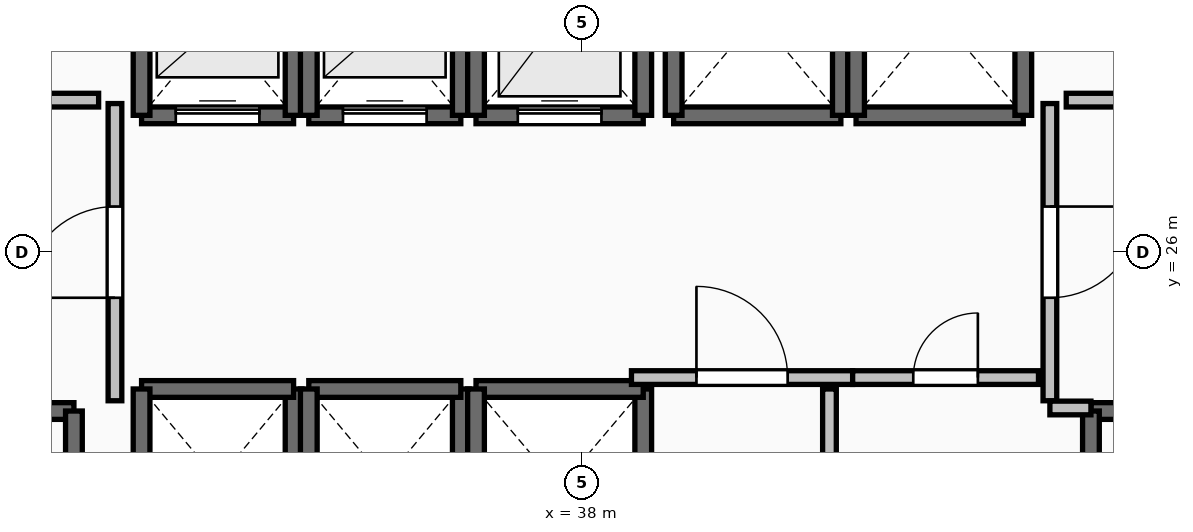
"""IFC4 building model, lengths in metres.
Left out: names, types, materials, properties, quantities, classifications, styles, units other than length and angle.
Written with IfcOpenShell. Run it as: python <this file> out.ifc"""

import sys

from ifc_helpers import new_model, si_unit, direction, frame, frame_2d, origin, place, context, subcontext, project, spatial, rectangle, extrude, element, fill, save


model = new_model("IFC4")
c1 = context("Model", 3, precision=1e-05, world=origin(), true_north=direction((0.0, 1.0)))
c2 = subcontext(c1, "Body", "Model", "MODEL_VIEW")
j1 = project(units=[si_unit("LENGTHUNIT", "METRE"), si_unit("PLANEANGLEUNIT", "RADIAN")], contexts=[c1])
p1 = place(None, origin())
s1 = spatial("IfcSite", under=j1, at=p1, CompositionType="ELEMENT")
p2 = place(p1, origin())
s2 = spatial("IfcBuilding", under=s1, at=p2, CompositionType="ELEMENT")
p3 = place(p2, frame((0.0, 0.0, 78.8)))
s3 = spatial("IfcBuildingStorey", under=s2, at=p3, CompositionType="ELEMENT", Elevation=78.8)
p4 = place(p3, frame((27.94, 23.91, 0.0), z_axis=(0.0, 0.0, 1.0), x_axis=(1.0, 0.0, 0.0)))
e1 = element("IfcWall", 1, at=p4, inside=s3, PredefinedType="SOLIDWALL", context=c2, shape_type="SweptSolid", body=[
    extrude(rectangle(XDim=3.37, YDim=0.22, at=frame_2d((1.685, 0.0))), origin(), (0.0, 0.0, 1.0), 3.24),
])
p5 = place(p4, frame((1.135, 0.0, 0.0)))
e2 = element("IfcOpeningElement", 2, at=p5, cuts=e1, PredefinedType="OPENING", context=c2, shape_type="SweptSolid", body=[
    extrude(rectangle(XDim=1.1, YDim=2.15, at=frame_2d((0.55, 1.075))), frame((0.0, 0.125, 0.0), z_axis=(0.0, -1.0, 0.0), x_axis=(1.0, 0.0, 0.0)), (0.0, 0.0, 1.0), 0.25),
])
p6 = place(p3, frame((31.31, 23.91, 0.0), z_axis=(0.0, 0.0, 1.0), x_axis=(0.0, -1.0, 0.0)))
e3 = element("IfcWall", 3, at=p6, inside=s3, PredefinedType="SOLIDWALL", context=c2, shape_type="SweptSolid", body=[
    extrude(rectangle(XDim=7.42, YDim=0.22, at=frame_2d((3.71, 0.0))), origin(), (0.0, 0.0, 1.0), 3.24),
])
p7 = place(p3, frame((44.69, 23.91, 0.0), z_axis=(0.0, 0.0, 1.0), x_axis=(1.0, 0.0, 0.0)))
e4 = element("IfcWall", 4, at=p7, inside=s3, PredefinedType="SOLIDWALL", context=c2, shape_type="SweptSolid", body=[
    extrude(rectangle(XDim=3.37, YDim=0.22, at=frame_2d((1.685, 0.0))), origin(), (0.0, 0.0, 1.0), 3.24),
])
p8 = place(p7, frame((1.135, 0.0, 0.0)))
e5 = element("IfcOpeningElement", 5, at=p8, cuts=e4, PredefinedType="OPENING", context=c2, shape_type="SweptSolid", body=[
    extrude(rectangle(XDim=1.1, YDim=2.15, at=frame_2d((0.55, 1.075))), frame((0.0, 0.125, 0.0), z_axis=(0.0, -1.0, 0.0), x_axis=(1.0, 0.0, 0.0)), (0.0, 0.0, 1.0), 0.25),
])
p9 = place(p3, frame((44.69, 16.49, 0.0), z_axis=(0.0, 0.0, 1.0), x_axis=(0.0, 1.0, 0.0)))
e6 = element("IfcWall", 6, at=p9, inside=s3, PredefinedType="SOLIDWALL", context=c2, shape_type="SweptSolid", body=[
    extrude(rectangle(XDim=7.42, YDim=0.22, at=frame_2d((3.71, 0.0))), origin(), (0.0, 0.0, 1.0), 3.24),
])
p10 = place(p3, frame((32.2, 27.8, 0.0), z_axis=(0.0, 0.0, 1.0), x_axis=(1.0, 0.0, 0.0)))
e7 = element("IfcWall", 7, at=p10, inside=s3, PredefinedType="SOLIDWALL", context=c2, shape_type="SweptSolid", body=[
    extrude(rectangle(XDim=2.0, YDim=0.22, at=frame_2d((1.0, 0.0))), origin(), (0.0, 0.0, 1.0), 3.24),
])
p11 = place(p10, frame((0.45, 0.0, 0.0)))
e8 = element("IfcOpeningElement", 8, at=p11, cuts=e7, PredefinedType="OPENING", context=c2, shape_type="SweptSolid", body=[
    extrude(rectangle(XDim=1.1, YDim=2.2, at=frame_2d((0.55, 1.1))), frame((0.0, 0.125, 0.0), z_axis=(0.0, -1.0, 0.0), x_axis=(1.0, 0.0, 0.0)), (0.0, 0.0, 1.0), 0.25),
])
for number, where, z_axis, x_axis in (
    (9, (34.2, 27.8, 0.0), (0.0, 0.0, 1.0), (0.0, 1.0, 0.0)),
    (10, (32.2, 30.2, 0.0), (0.0, 0.0, 1.0), (0.0, -1.0, 0.0)),
):
    element("IfcWall", number, at=place(p3, frame(where, z_axis=z_axis, x_axis=x_axis)), inside=s3, PredefinedType="SOLIDWALL", context=c2, shape_type="SweptSolid", body=[
        extrude(rectangle(XDim=2.4, YDim=0.22, at=frame_2d((1.2, 0.0))), origin(), (0.0, 0.0, 1.0), 3.24),
    ])
p12 = place(p3, frame((34.4, 27.8, 0.0), z_axis=(0.0, 0.0, 1.0), x_axis=(1.0, 0.0, 0.0)))
e11 = element("IfcWall", 11, at=p12, inside=s3, PredefinedType="SOLIDWALL", context=c2, shape_type="SweptSolid", body=[
    extrude(rectangle(XDim=2.0, YDim=0.22, at=frame_2d((1.0, 0.0))), origin(), (0.0, 0.0, 1.0), 3.24),
])
p13 = place(p12, frame((0.45, 0.0, 0.0)))
e12 = element("IfcOpeningElement", 12, at=p13, cuts=e11, PredefinedType="OPENING", context=c2, shape_type="SweptSolid", body=[
    extrude(rectangle(XDim=1.1, YDim=2.2, at=frame_2d((0.55, 1.1))), frame((0.0, 0.125, 0.0), z_axis=(0.0, -1.0, 0.0), x_axis=(1.0, 0.0, 0.0)), (0.0, 0.0, 1.0), 0.25),
])
for number, where, z_axis, x_axis in (
    (13, (36.4, 27.8, 0.0), (0.0, 0.0, 1.0), (0.0, 1.0, 0.0)),
    (14, (34.4, 30.2, 0.0), (0.0, 0.0, 1.0), (0.0, -1.0, 0.0)),
):
    element("IfcWall", number, at=place(p3, frame(where, z_axis=z_axis, x_axis=x_axis)), inside=s3, PredefinedType="SOLIDWALL", context=c2, shape_type="SweptSolid", body=[
        extrude(rectangle(XDim=2.4, YDim=0.22, at=frame_2d((1.2, 0.0))), origin(), (0.0, 0.0, 1.0), 3.24),
    ])
p14 = place(p3, frame((36.6, 27.8, 0.0), z_axis=(0.0, 0.0, 1.0), x_axis=(1.0, 0.0, 0.0)))
e15 = element("IfcWall", 15, at=p14, inside=s3, PredefinedType="SOLIDWALL", context=c2, shape_type="SweptSolid", body=[
    extrude(rectangle(XDim=2.2, YDim=0.22, at=frame_2d((1.1, 0.0))), origin(), (0.0, 0.0, 1.0), 3.24),
])
p15 = place(p14, frame((0.55, 0.0, 0.0)))
e16 = element("IfcOpeningElement", 16, at=p15, cuts=e15, PredefinedType="OPENING", context=c2, shape_type="SweptSolid", body=[
    extrude(rectangle(XDim=1.1, YDim=2.2, at=frame_2d((0.55, 1.1))), frame((0.0, 0.125, 0.0), z_axis=(0.0, -1.0, 0.0), x_axis=(1.0, 0.0, 0.0)), (0.0, 0.0, 1.0), 0.25),
])
for number, where, z_axis, x_axis in (
    (17, (38.8, 27.8, 0.0), (0.0, 0.0, 1.0), (0.0, 1.0, 0.0)),
    (18, (36.6, 30.4, 0.0), (0.0, 0.0, 1.0), (0.0, -1.0, 0.0)),
):
    element("IfcWall", number, at=place(p3, frame(where, z_axis=z_axis, x_axis=x_axis)), inside=s3, PredefinedType="SOLIDWALL", context=c2, shape_type="SweptSolid", body=[
        extrude(rectangle(XDim=2.6, YDim=0.22, at=frame_2d((1.3, 0.0))), origin(), (0.0, 0.0, 1.0), 3.24),
    ])
p16 = place(p3, frame((34.2, 21.8, 0.0), z_axis=(0.0, 0.0, 1.0), x_axis=(0.0, 1.0, 0.0)))
e19 = element("IfcWall", 19, at=p16, inside=s3, PredefinedType="SOLIDWALL", context=c2, shape_type="SweptSolid", body=[
    extrude(rectangle(XDim=2.4, YDim=0.22, at=frame_2d((1.2, 0.0))), origin(), (0.0, 0.0, 1.0), 3.24),
])
p17 = place(p3, frame((34.2, 24.2, 0.0), z_axis=(0.0, 0.0, 1.0), x_axis=(-1.0, 0.0, 0.0)))
e20 = element("IfcWall", 20, at=p17, inside=s3, PredefinedType="SOLIDWALL", context=c2, shape_type="SweptSolid", body=[
    extrude(rectangle(XDim=2.0, YDim=0.22, at=frame_2d((1.0, 0.0))), origin(), (0.0, 0.0, 1.0), 3.24),
])
for number, where, z_axis, x_axis in (
    (21, (32.2, 24.2, 0.0), (0.0, 0.0, 1.0), (0.0, -1.0, 0.0)),
    (22, (36.4, 21.8, 0.0), (0.0, 0.0, 1.0), (0.0, 1.0, 0.0)),
):
    element("IfcWall", number, at=place(p3, frame(where, z_axis=z_axis, x_axis=x_axis)), inside=s3, PredefinedType="SOLIDWALL", context=c2, shape_type="SweptSolid", body=[
        extrude(rectangle(XDim=2.4, YDim=0.22, at=frame_2d((1.2, 0.0))), origin(), (0.0, 0.0, 1.0), 3.24),
    ])
p18 = place(p3, frame((36.4, 24.2, 0.0), z_axis=(0.0, 0.0, 1.0), x_axis=(-1.0, 0.0, 0.0)))
e23 = element("IfcWall", 23, at=p18, inside=s3, PredefinedType="SOLIDWALL", context=c2, shape_type="SweptSolid", body=[
    extrude(rectangle(XDim=2.0, YDim=0.22, at=frame_2d((1.0, 0.0))), origin(), (0.0, 0.0, 1.0), 3.24),
])
p19 = place(p3, frame((34.4, 24.2, 0.0), z_axis=(0.0, 0.0, 1.0), x_axis=(0.0, -1.0, 0.0)))
e24 = element("IfcWall", 24, at=p19, inside=s3, PredefinedType="SOLIDWALL", context=c2, shape_type="SweptSolid", body=[
    extrude(rectangle(XDim=2.4, YDim=0.22, at=frame_2d((1.2, 0.0))), origin(), (0.0, 0.0, 1.0), 3.24),
])
p20 = place(p3, frame((38.8, 21.6, 0.0), z_axis=(0.0, 0.0, 1.0), x_axis=(0.0, 1.0, 0.0)))
e25 = element("IfcWall", 25, at=p20, inside=s3, PredefinedType="SOLIDWALL", context=c2, shape_type="SweptSolid", body=[
    extrude(rectangle(XDim=2.6, YDim=0.22, at=frame_2d((1.3, 0.0))), origin(), (0.0, 0.0, 1.0), 3.24),
])
p21 = place(p3, frame((38.8, 24.2, 0.0), z_axis=(0.0, 0.0, 1.0), x_axis=(-1.0, 0.0, 0.0)))
e26 = element("IfcWall", 26, at=p21, inside=s3, PredefinedType="SOLIDWALL", context=c2, shape_type="SweptSolid", body=[
    extrude(rectangle(XDim=2.2, YDim=0.22, at=frame_2d((1.1, 0.0))), origin(), (0.0, 0.0, 1.0), 3.24),
])
p22 = place(p3, frame((36.6, 24.2, 0.0), z_axis=(0.0, 0.0, 1.0), x_axis=(0.0, -1.0, 0.0)))
e27 = element("IfcWall", 27, at=p22, inside=s3, PredefinedType="SOLIDWALL", context=c2, shape_type="SweptSolid", body=[
    extrude(rectangle(XDim=2.6, YDim=0.22, at=frame_2d((1.3, 0.0))), origin(), (0.0, 0.0, 1.0), 3.24),
])
p23 = place(p3, frame((39.2, 27.8, 0.0), z_axis=(0.0, 0.0, 1.0), x_axis=(1.0, 0.0, 0.0)))
e28 = element("IfcWall", 28, at=p23, inside=s3, PredefinedType="SOLIDWALL", context=c2, shape_type="SweptSolid", body=[
    extrude(rectangle(XDim=2.2, YDim=0.22, at=frame_2d((1.1, 0.0))), origin(), (0.0, 0.0, 1.0), 3.24),
])
for number, where, z_axis, x_axis in (
    (29, (41.4, 27.8, 0.0), (0.0, 0.0, 1.0), (0.0, 1.0, 0.0)),
    (30, (39.2, 30.4, 0.0), (0.0, 0.0, 1.0), (0.0, -1.0, 0.0)),
):
    element("IfcWall", number, at=place(p3, frame(where, z_axis=z_axis, x_axis=x_axis)), inside=s3, PredefinedType="SOLIDWALL", context=c2, shape_type="SweptSolid", body=[
        extrude(rectangle(XDim=2.6, YDim=0.22, at=frame_2d((1.3, 0.0))), origin(), (0.0, 0.0, 1.0), 3.24),
    ])
p24 = place(p3, frame((41.6, 27.8, 0.0), z_axis=(0.0, 0.0, 1.0), x_axis=(1.0, 0.0, 0.0)))
e31 = element("IfcWall", 31, at=p24, inside=s3, PredefinedType="SOLIDWALL", context=c2, shape_type="SweptSolid", body=[
    extrude(rectangle(XDim=2.2, YDim=0.22, at=frame_2d((1.1, 0.0))), origin(), (0.0, 0.0, 1.0), 3.24),
])
for number, where, z_axis, x_axis in (
    (32, (43.8, 27.8, 0.0), (0.0, 0.0, 1.0), (0.0, 1.0, 0.0)),
    (33, (41.6, 30.4, 0.0), (0.0, 0.0, 1.0), (0.0, -1.0, 0.0)),
):
    element("IfcWall", number, at=place(p3, frame(where, z_axis=z_axis, x_axis=x_axis)), inside=s3, PredefinedType="SOLIDWALL", context=c2, shape_type="SweptSolid", body=[
        extrude(rectangle(XDim=2.6, YDim=0.22, at=frame_2d((1.3, 0.0))), origin(), (0.0, 0.0, 1.0), 3.24),
    ])
p25 = place(p3, frame((31.85, 24.045, 0.0), z_axis=(0.0, 0.0, 1.0), x_axis=(0.0, 1.0, 0.0)))
e34 = element("IfcWall", 34, at=p25, inside=s3, PredefinedType="PARTITIONING", context=c2, shape_type="SweptSolid", body=[
    extrude(rectangle(XDim=3.91, YDim=0.18, at=frame_2d((1.955, 0.0))), origin(), (0.0, 0.0, 1.0), 3.24),
])
p26 = place(p25, frame((1.355, 0.0, 0.0)))
e35 = element("IfcOpeningElement", 35, at=p26, cuts=e34, PredefinedType="OPENING", context=c2, shape_type="SweptSolid", body=[
    extrude(rectangle(XDim=1.2, YDim=2.15, at=frame_2d((0.6, 1.075))), frame((0.0, 0.105, 0.0), z_axis=(0.0, -1.0, 0.0), x_axis=(1.0, 0.0, 0.0)), (0.0, 0.0, 1.0), 0.21),
])
p27 = place(p3, frame((44.15, 27.955, 0.0), z_axis=(0.0, 0.0, 1.0), x_axis=(0.0, -1.0, 0.0)))
e36 = element("IfcWall", 36, at=p27, inside=s3, PredefinedType="PARTITIONING", context=c2, shape_type="SweptSolid", body=[
    extrude(rectangle(XDim=3.91, YDim=0.18, at=frame_2d((1.955, 0.0))), origin(), (0.0, 0.0, 1.0), 3.24),
])
p28 = place(p27, frame((1.355, 0.0, 0.0)))
e37 = element("IfcOpeningElement", 37, at=p28, cuts=e36, PredefinedType="OPENING", context=c2, shape_type="SweptSolid", body=[
    extrude(rectangle(XDim=1.2, YDim=2.15, at=frame_2d((0.6, 1.075))), frame((0.0, 0.105, 0.0), z_axis=(0.0, -1.0, 0.0), x_axis=(1.0, 0.0, 0.0)), (0.0, 0.0, 1.0), 0.21),
])
p29 = place(p3, frame((44.15, 23.95, 0.0), z_axis=(0.0, 0.0, 1.0), x_axis=(1.0, 0.0, 0.0)))
e38 = element("IfcWall", 38, at=p29, inside=s3, PredefinedType="PARTITIONING", context=c2, shape_type="SweptSolid", body=[
    extrude(rectangle(XDim=0.54, YDim=0.18, at=frame_2d((0.27, 0.0))), origin(), (0.0, 0.0, 1.0), 3.24),
])
p30 = place(p3, frame((38.645, 24.35, 0.0), z_axis=(0.0, 0.0, 1.0), x_axis=(1.0, 0.0, 0.0)))
e39 = element("IfcWall", 39, at=p30, inside=s3, PredefinedType="PARTITIONING", context=c2, shape_type="SweptSolid", body=[
    extrude(rectangle(XDim=2.91, YDim=0.18, at=frame_2d((1.455, 0.0))), origin(), (0.0, 0.0, 1.0), 3.24),
])
p31 = place(p30, frame((0.855, 0.0, 0.0)))
e40 = element("IfcOpeningElement", 40, at=p31, cuts=e39, PredefinedType="OPENING", context=c2, shape_type="SweptSolid", body=[
    extrude(rectangle(XDim=1.2, YDim=2.15, at=frame_2d((0.6, 1.075))), frame((0.0, 0.105, 0.0), z_axis=(0.0, -1.0, 0.0), x_axis=(1.0, 0.0, 0.0)), (0.0, 0.0, 1.0), 0.21),
])
p32 = place(p3, frame((41.555, 24.35, 0.0), z_axis=(0.0, 0.0, 1.0), x_axis=(1.0, 0.0, 0.0)))
e41 = element("IfcWall", 41, at=p32, inside=s3, PredefinedType="PARTITIONING", context=c2, shape_type="SweptSolid", body=[
    extrude(rectangle(XDim=2.445, YDim=0.18, at=frame_2d((1.223, 0.0))), origin(), (0.0, 0.0, 1.0), 3.24),
])
p33 = place(p32, frame((0.798, 0.0, 0.0)))
e42 = element("IfcOpeningElement", 42, at=p33, cuts=e41, PredefinedType="OPENING", context=c2, shape_type="SweptSolid", body=[
    extrude(rectangle(XDim=0.85, YDim=2.1, at=frame_2d((0.425, 1.05))), frame((0.0, 0.105, 0.0), z_axis=(0.0, -1.0, 0.0), x_axis=(1.0, 0.0, 0.0)), (0.0, 0.0, 1.0), 0.21),
])
p34 = place(p3, frame((41.25, 20.305, 0.0), z_axis=(0.0, 0.0, 1.0), x_axis=(0.0, 1.0, 0.0)))
e43 = element("IfcWall", 43, at=p34, inside=s3, PredefinedType="PARTITIONING", context=c2, shape_type="SweptSolid", body=[
    extrude(rectangle(XDim=3.895, YDim=0.18, at=frame_2d((1.948, 0.0))), origin(), (0.0, 0.0, 1.0), 3.24),
])
p35 = place(p34, frame((1.522, 0.0, 0.0)))
e44 = element("IfcOpeningElement", 44, at=p35, cuts=e43, PredefinedType="OPENING", context=c2, shape_type="SweptSolid", body=[
    extrude(rectangle(XDim=0.85, YDim=2.1, at=frame_2d((0.425, 1.05))), frame((0.0, 0.105, 0.0), z_axis=(0.0, -1.0, 0.0), x_axis=(1.0, 0.0, 0.0)), (0.0, 0.0, 1.0), 0.21),
])
for number, where, z_axis, x_axis in (
    (45, (31.635, 28.0, 0.0), (0.0, 0.0, 1.0), (-1.0, 0.0, 0.0)),
    (46, (45.28, 28.0, 0.0), (0.0, 0.0, 1.0), (-1.0, 0.0, 0.0)),
):
    element("IfcWall", number, at=place(p3, frame(where, z_axis=z_axis, x_axis=x_axis)), inside=s3, PredefinedType="PARTITIONING", context=c2, shape_type="SweptSolid", body=[
        extrude(rectangle(XDim=0.915, YDim=0.18, at=frame_2d((0.458, 0.0))), origin(), (0.0, 0.0, 1.0), 3.24),
    ])
p36 = place(p11, origin())
e47 = element("IfcDoor", 47, at=p36, inside=s3, OperationType="SLIDING_TO_LEFT", PredefinedType="DOOR", context=c2, shape_type="SweptSolid", body=[
    extrude(rectangle(XDim=1.1, YDim=2.2, at=frame_2d((0.55, 1.1))), frame((0.0, 0.025, 0.0), z_axis=(0.0, -1.0, 0.0), x_axis=(1.0, 0.0, 0.0)), (0.0, 0.0, 1.0), 0.05),
])
fill(e8, e47)
p37 = place(p13, origin())
e48 = element("IfcDoor", 48, at=p37, inside=s3, OperationType="SLIDING_TO_LEFT", PredefinedType="DOOR", context=c2, shape_type="SweptSolid", body=[
    extrude(rectangle(XDim=1.1, YDim=2.2, at=frame_2d((0.55, 1.1))), frame((0.0, 0.025, 0.0), z_axis=(0.0, -1.0, 0.0), x_axis=(1.0, 0.0, 0.0)), (0.0, 0.0, 1.0), 0.05),
])
fill(e12, e48)
p38 = place(p15, origin())
e49 = element("IfcDoor", 49, at=p38, inside=s3, OperationType="SLIDING_TO_LEFT", PredefinedType="DOOR", context=c2, shape_type="SweptSolid", body=[
    extrude(rectangle(XDim=1.1, YDim=2.2, at=frame_2d((0.55, 1.1))), frame((0.0, 0.025, 0.0), z_axis=(0.0, -1.0, 0.0), x_axis=(1.0, 0.0, 0.0)), (0.0, 0.0, 1.0), 0.05),
])
fill(e16, e49)
p39 = place(p26, origin())
e50 = element("IfcDoor", 50, at=p39, inside=s3, OperationType="SINGLE_SWING_LEFT", PredefinedType="DOOR", context=c2, shape_type="SweptSolid", body=[
    extrude(rectangle(XDim=1.2, YDim=2.15, at=frame_2d((0.6, 1.075))), frame((0.0, 0.025, 0.0), z_axis=(0.0, -1.0, 0.0), x_axis=(1.0, 0.0, 0.0)), (0.0, 0.0, 1.0), 0.05),
])
fill(e35, e50)
p40 = place(p28, origin())
e51 = element("IfcDoor", 51, at=p40, inside=s3, OperationType="SINGLE_SWING_LEFT", PredefinedType="DOOR", context=c2, shape_type="SweptSolid", body=[
    extrude(rectangle(XDim=1.2, YDim=2.15, at=frame_2d((0.6, 1.075))), frame((0.0, 0.025, 0.0), z_axis=(0.0, -1.0, 0.0), x_axis=(1.0, 0.0, 0.0)), (0.0, 0.0, 1.0), 0.05),
])
fill(e37, e51)
p41 = place(p31, origin())
e52 = element("IfcDoor", 52, at=p41, inside=s3, OperationType="SINGLE_SWING_LEFT", PredefinedType="DOOR", context=c2, shape_type="SweptSolid", body=[
    extrude(rectangle(XDim=1.2, YDim=2.15, at=frame_2d((0.6, 1.075))), frame((0.0, 0.025, 0.0), z_axis=(0.0, -1.0, 0.0), x_axis=(1.0, 0.0, 0.0)), (0.0, 0.0, 1.0), 0.05),
])
fill(e40, e52)
p42 = place(p33, origin())
e53 = element("IfcDoor", 53, at=p42, inside=s3, OperationType="SINGLE_SWING_RIGHT", PredefinedType="DOOR", context=c2, shape_type="SweptSolid", body=[
    extrude(rectangle(XDim=0.85, YDim=2.1, at=frame_2d((0.425, 1.05))), frame((0.0, 0.025, 0.0), z_axis=(0.0, -1.0, 0.0), x_axis=(1.0, 0.0, 0.0)), (0.0, 0.0, 1.0), 0.05),
])
fill(e42, e53)
save(model, sys.argv[1])
